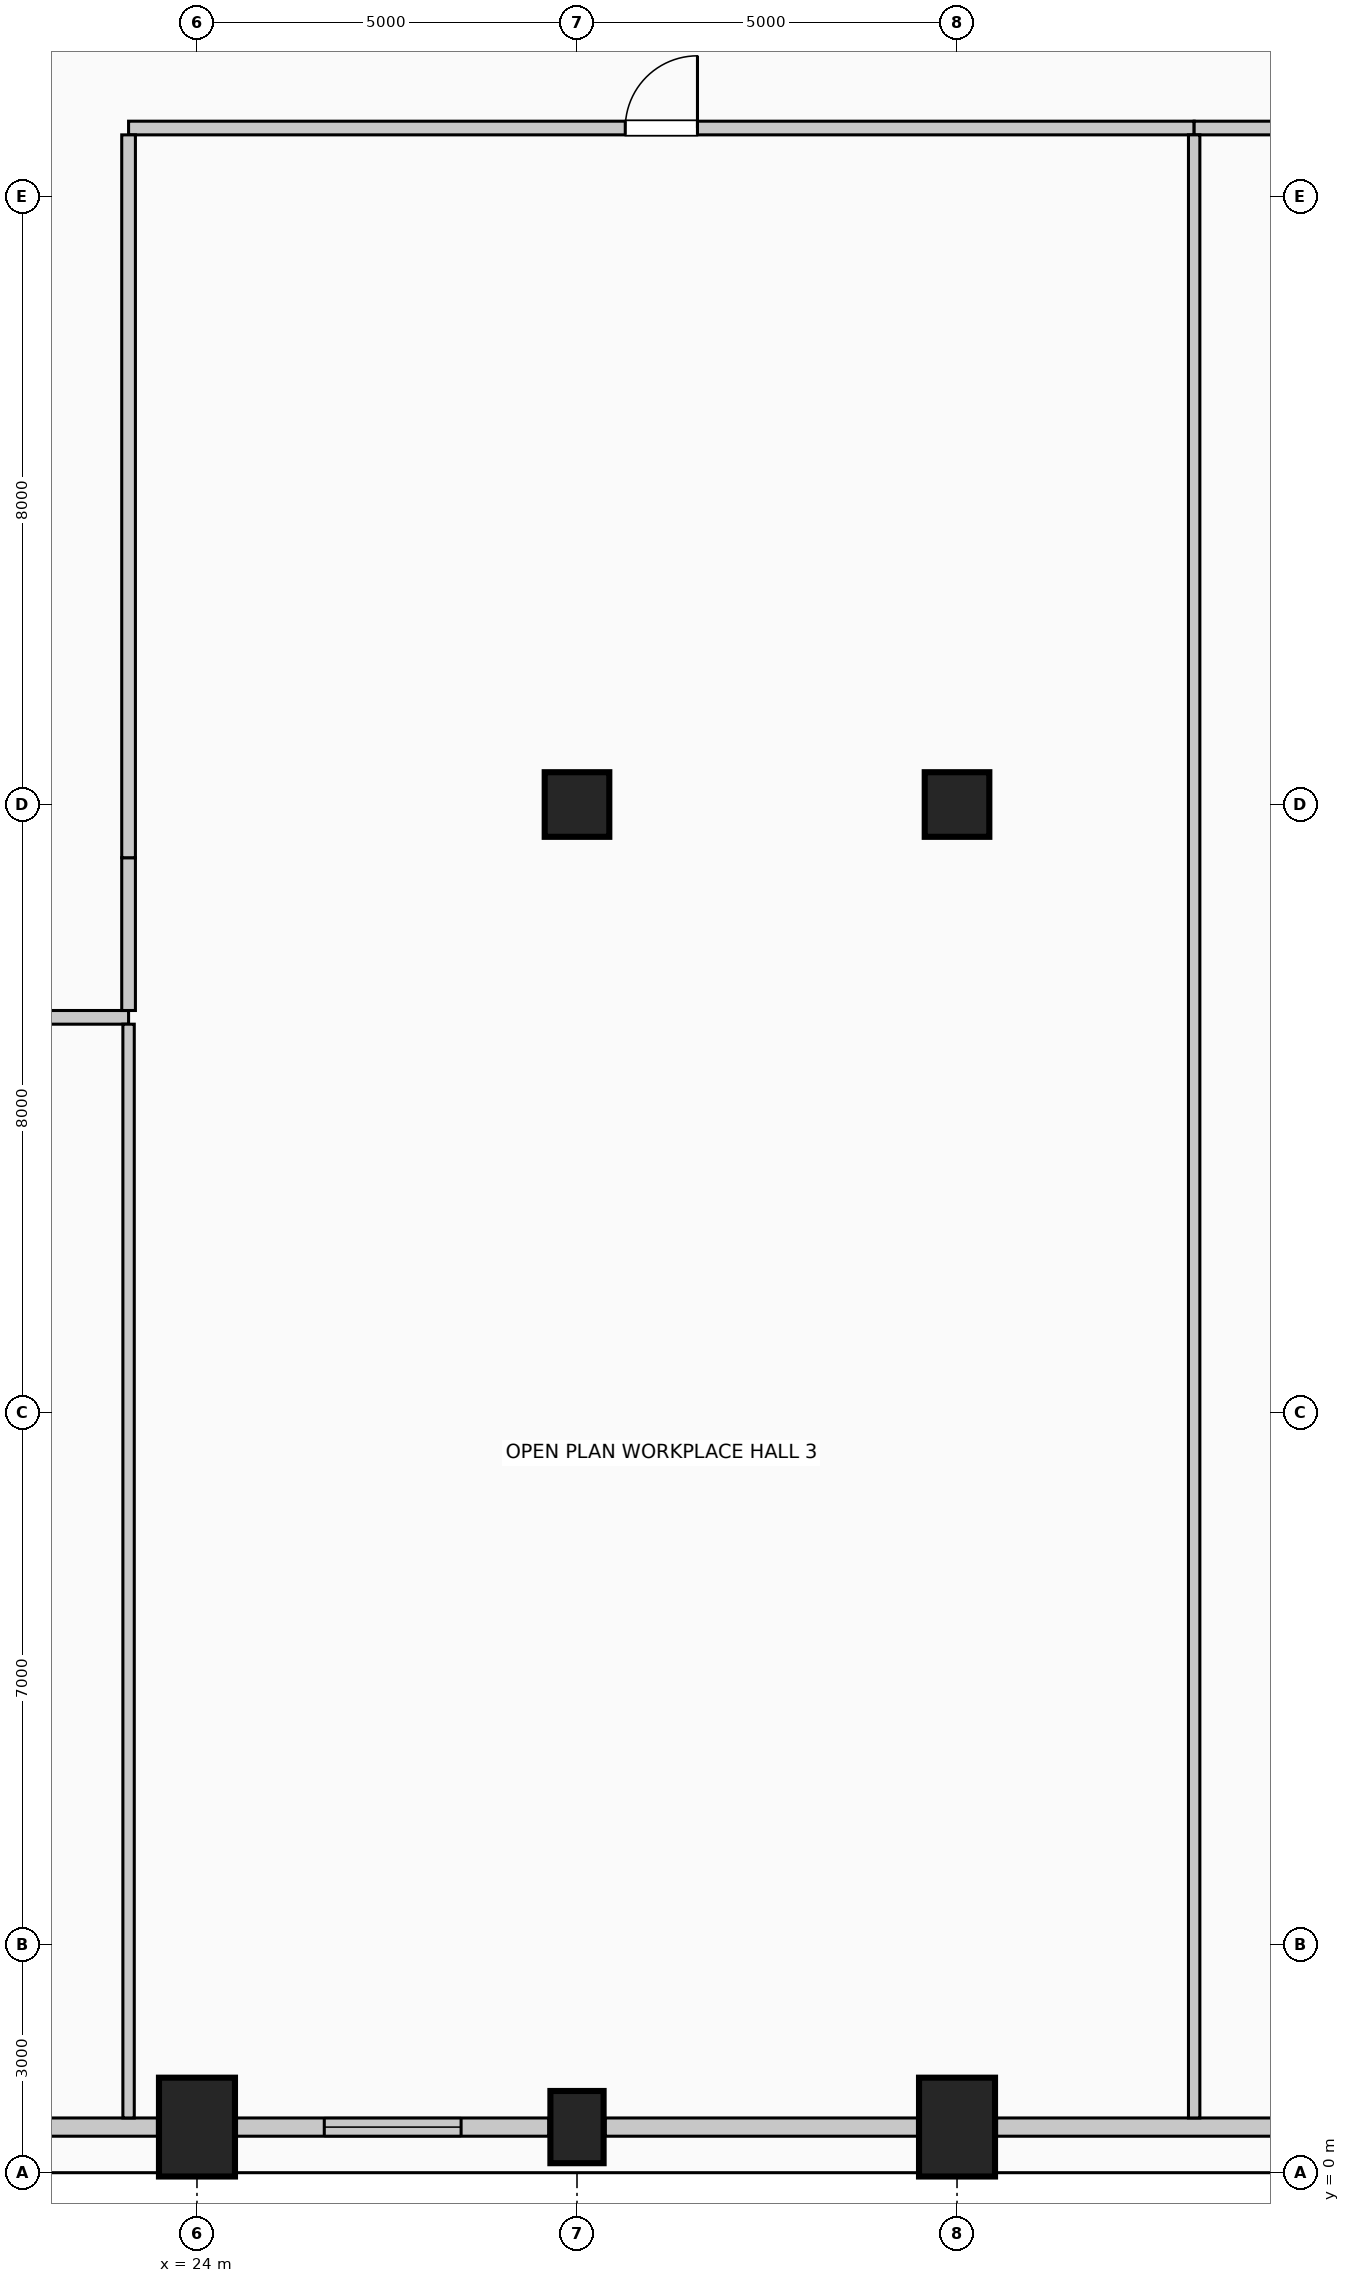
"""IFC4 building model, lengths in metres.
Left out: names, types, materials, properties, quantities, classifications, styles, units other than length and angle.
Written with IfcOpenShell. Run it as: python <this file> out.ifc"""

import sys

from ifc_helpers import new_model, si_unit, direction, frame, frame_2d, origin, origin_2d, place, context, subcontext, project, spatial, rectangle, circle, extrude, element, fill, save


model = new_model("IFC4")
c1 = context("Model", 3, precision=1e-05, world=origin(), true_north=direction((0.0, 1.0)))
c2 = subcontext(c1, "Body", "Model", "MODEL_VIEW")
j1 = project(units=[si_unit("LENGTHUNIT", "METRE"), si_unit("PLANEANGLEUNIT", "RADIAN")], contexts=[c1])
p1 = place(None, origin())
s1 = spatial("IfcSite", under=j1, at=p1, CompositionType="ELEMENT")
p2 = place(p1, origin())
s2 = spatial("IfcBuilding", under=s1, at=p2, CompositionType="ELEMENT")
p3 = place(p2, frame((0.0, 0.0, 272.6)))
s3 = spatial("IfcBuildingStorey", under=s2, at=p3, CompositionType="ELEMENT", Elevation=272.6)
p4 = place(p3, frame((24.0, 0.6, 0.0), z_axis=(0.0, 0.0, 1.0), x_axis=(1.0, 0.0, 0.0)))
e1 = element("IfcColumn", 1, at=p4, inside=s3, PredefinedType="COLUMN", context=c2, shape_type="SweptSolid", body=[
    extrude(rectangle(XDim=1.0, YDim=1.3, at=origin_2d()), origin(), (0.0, 0.0, 1.0), 4.0),
])
p5 = place(p3, frame((29.0, 0.6, 0.0), z_axis=(0.0, 0.0, 1.0), x_axis=(1.0, 0.0, 0.0)))
e2 = element("IfcColumn", 2, at=p5, inside=s3, PredefinedType="COLUMN", context=c2, shape_type="SweptSolid", body=[
    extrude(rectangle(XDim=0.7, YDim=0.95, at=origin_2d()), origin(), (0.0, 0.0, 1.0), 4.0),
])
p6 = place(p3, frame((34.0, 0.6, 0.0), z_axis=(0.0, 0.0, 1.0), x_axis=(1.0, 0.0, 0.0)))
e3 = element("IfcColumn", 3, at=p6, inside=s3, PredefinedType="COLUMN", context=c2, shape_type="SweptSolid", body=[
    extrude(rectangle(XDim=1.0, YDim=1.3, at=origin_2d()), origin(), (0.0, 0.0, 1.0), 4.0),
])
for number, where, z_axis, x_axis in (
    (4, (29.0, 18.0, 0.0), (0.0, 0.0, 1.0), (1.0, 0.0, 0.0)),
    (5, (34.0, 18.0, 0.0), (0.0, 0.0, 1.0), (1.0, 0.0, 0.0)),
):
    element("IfcColumn", number, at=place(p3, frame(where, z_axis=z_axis, x_axis=x_axis)), inside=s3, PredefinedType="COLUMN", context=c2, shape_type="SweptSolid", body=[
        extrude(circle(Radius=0.425, at=origin_2d()), origin(), (0.0, 0.0, 1.0), 4.0),
    ])
p7 = place(p3, frame((23.48, 0.6, 0.0), z_axis=(0.0, 0.0, 1.0), x_axis=(-1.0, 0.0, 0.0)))
e6 = element("IfcWall", 6, at=p7, inside=s3, PredefinedType="SOLIDWALL", context=c2, shape_type="SweptSolid", body=[
    extrude(rectangle(XDim=6.56, YDim=0.24, at=frame_2d((3.28, 0.0))), origin(), (0.0, 0.0, 1.0), 3.0),
])
p8 = place(p7, frame((3.773, 0.0, 0.42)))
e7 = element("IfcOpeningElement", 7, at=p8, cuts=e6, PredefinedType="OPENING", context=c2, shape_type="SweptSolid", body=[
    extrude(rectangle(XDim=1.8, YDim=2.2, at=frame_2d((0.9, 1.1))), frame((0.0, 0.13, 0.0), z_axis=(0.0, -1.0, 0.0), x_axis=(1.0, 0.0, 0.0)), (0.0, 0.0, 1.0), 0.26),
])
p9 = place(p3, frame((28.63, 0.6, 0.0), z_axis=(0.0, 0.0, 1.0), x_axis=(-1.0, 0.0, 0.0)))
e8 = element("IfcWall", 8, at=p9, inside=s3, PredefinedType="SOLIDWALL", context=c2, shape_type="SweptSolid", body=[
    extrude(rectangle(XDim=4.11, YDim=0.24, at=frame_2d((2.055, 0.0))), origin(), (0.0, 0.0, 1.0), 3.0),
])
p10 = place(p9, frame((1.155, 0.0, 0.42)))
e9 = element("IfcOpeningElement", 9, at=p10, cuts=e8, PredefinedType="OPENING", context=c2, shape_type="SweptSolid", body=[
    extrude(rectangle(XDim=1.8, YDim=2.2, at=frame_2d((0.9, 1.1))), frame((0.0, 0.13, 0.0), z_axis=(0.0, -1.0, 0.0), x_axis=(1.0, 0.0, 0.0)), (0.0, 0.0, 1.0), 0.26),
])
p11 = place(p3, frame((33.48, 0.6, 0.0), z_axis=(0.0, 0.0, 1.0), x_axis=(-1.0, 0.0, 0.0)))
e10 = element("IfcWall", 10, at=p11, inside=s3, PredefinedType="SOLIDWALL", context=c2, shape_type="SweptSolid", body=[
    extrude(rectangle(XDim=4.11, YDim=0.24, at=frame_2d((2.055, 0.0))), origin(), (0.0, 0.0, 1.0), 3.0),
])
p12 = place(p3, frame((41.08, 0.6, 0.0), z_axis=(0.0, 0.0, 1.0), x_axis=(-1.0, 0.0, 0.0)))
e11 = element("IfcWall", 11, at=p12, inside=s3, PredefinedType="SOLIDWALL", context=c2, shape_type="SweptSolid", body=[
    extrude(rectangle(XDim=6.56, YDim=0.24, at=frame_2d((3.28, 0.0))), origin(), (0.0, 0.0, 1.0), 3.0),
])
p13 = place(p12, frame((0.987, 0.0, 0.42)))
e12 = element("IfcOpeningElement", 12, at=p13, cuts=e11, PredefinedType="OPENING", context=c2, shape_type="SweptSolid", body=[
    extrude(rectangle(XDim=1.8, YDim=2.2, at=frame_2d((0.9, 1.1))), frame((0.0, 0.13, 0.0), z_axis=(0.0, -1.0, 0.0), x_axis=(1.0, 0.0, 0.0)), (0.0, 0.0, 1.0), 0.26),
])
p14 = place(p3, frame((10.52, 15.2, 0.0), z_axis=(0.0, 0.0, 1.0), x_axis=(1.0, 0.0, 0.0)))
e13 = element("IfcWall", 13, at=p14, inside=s3, PredefinedType="PARTITIONING", context=c2, shape_type="SweptSolid", body=[
    extrude(rectangle(XDim=12.58, YDim=0.18, at=frame_2d((6.29, 0.0))), origin(), (0.0, 0.0, 1.0), 3.75),
])
p15 = place(p14, frame((5.765, 0.0, 0.0)))
e14 = element("IfcOpeningElement", 14, at=p15, cuts=e13, PredefinedType="OPENING", context=c2, shape_type="SweptSolid", body=[
    extrude(rectangle(XDim=1.05, YDim=2.15, at=frame_2d((0.525, 1.075))), frame((0.0, 0.1, 0.0), z_axis=(0.0, -1.0, 0.0), x_axis=(1.0, 0.0, 0.0)), (0.0, 0.0, 1.0), 0.2),
])
p16 = place(p3, frame((23.1, 26.9, 0.0), z_axis=(0.0, 0.0, 1.0), x_axis=(1.0, 0.0, 0.0)))
e15 = element("IfcWall", 15, at=p16, inside=s3, PredefinedType="PARTITIONING", context=c2, shape_type="SweptSolid", body=[
    extrude(rectangle(XDim=14.02, YDim=0.18, at=frame_2d((7.01, 0.0))), origin(), (0.0, 0.0, 1.0), 3.75),
])
p17 = place(p16, frame((6.535, 0.0, 0.0)))
e16 = element("IfcOpeningElement", 16, at=p17, cuts=e15, PredefinedType="OPENING", context=c2, shape_type="SweptSolid", body=[
    extrude(rectangle(XDim=0.95, YDim=2.15, at=frame_2d((0.475, 1.075))), frame((0.0, 0.1, 0.0), z_axis=(0.0, -1.0, 0.0), x_axis=(1.0, 0.0, 0.0)), (0.0, 0.0, 1.0), 0.2),
])
p18 = place(p3, frame((37.12, 26.9, 0.0), z_axis=(0.0, 0.0, 1.0), x_axis=(1.0, 0.0, 0.0)))
e17 = element("IfcWall", 17, at=p18, inside=s3, PredefinedType="PARTITIONING", context=c2, shape_type="SweptSolid", body=[
    extrude(rectangle(XDim=6.84, YDim=0.18, at=frame_2d((3.42, 0.0))), origin(), (0.0, 0.0, 1.0), 3.75),
])
p19 = place(p18, frame((2.895, 0.0, 0.0)))
e18 = element("IfcOpeningElement", 18, at=p19, cuts=e17, PredefinedType="OPENING", context=c2, shape_type="SweptSolid", body=[
    extrude(rectangle(XDim=1.05, YDim=2.15, at=frame_2d((0.525, 1.075))), frame((0.0, 0.1, 0.0), z_axis=(0.0, -1.0, 0.0), x_axis=(1.0, 0.0, 0.0)), (0.0, 0.0, 1.0), 0.2),
])
p20 = place(p3, frame((23.1, 0.72, 0.0), z_axis=(0.0, 0.0, 1.0), x_axis=(0.0, 1.0, 0.0)))
e19 = element("IfcWall", 19, at=p20, inside=s3, PredefinedType="PARTITIONING", context=c2, shape_type="SweptSolid", body=[
    extrude(rectangle(XDim=14.39, YDim=0.15, at=frame_2d((7.195, 0.0))), origin(), (0.0, 0.0, 1.0), 3.75),
])
p21 = place(p3, frame((23.1, 15.29, 0.0), z_axis=(0.0, 0.0, 1.0), x_axis=(0.0, 1.0, 0.0)))
e20 = element("IfcWall", 20, at=p21, inside=s3, PredefinedType="PARTITIONING", context=c2, shape_type="SweptSolid", body=[
    extrude(rectangle(XDim=2.01, YDim=0.18, at=frame_2d((1.005, 0.0))), origin(), (0.0, 0.0, 1.0), 3.75),
])
p22 = place(p3, frame((23.1, 17.3, 0.0), z_axis=(0.0, 0.0, 1.0), x_axis=(0.0, 1.0, 0.0)))
e21 = element("IfcWall", 21, at=p22, inside=s3, PredefinedType="PARTITIONING", context=c2, shape_type="SweptSolid", body=[
    extrude(rectangle(XDim=9.51, YDim=0.18, at=frame_2d((4.755, 0.0))), origin(), (0.0, 0.0, 1.0), 3.75),
])
p23 = place(p3, frame((37.12, 0.72, 0.0), z_axis=(0.0, 0.0, 1.0), x_axis=(0.0, 1.0, 0.0)))
e22 = element("IfcWall", 22, at=p23, inside=s3, PredefinedType="PARTITIONING", context=c2, shape_type="SweptSolid", body=[
    extrude(rectangle(XDim=26.09, YDim=0.15, at=frame_2d((13.045, 0.0))), origin(), (0.0, 0.0, 1.0), 3.75),
])
p24 = place(p10, origin())
e23 = element("IfcWindow", 23, at=p24, inside=s3, PartitioningType="SINGLE_PANEL", PredefinedType="WINDOW", context=c2, shape_type="SweptSolid", body=[
    extrude(rectangle(XDim=1.8, YDim=2.2, at=frame_2d((0.9, 1.1))), frame((0.0, 0.03, 0.0), z_axis=(0.0, -1.0, 0.0), x_axis=(1.0, 0.0, 0.0)), (0.0, 0.0, 1.0), 0.06),
])
fill(e9, e23)
p25 = place(p17, origin())
e24 = element("IfcDoor", 24, at=p25, inside=s3, OperationType="SINGLE_SWING_RIGHT", PredefinedType="DOOR", context=c2, shape_type="SweptSolid", body=[
    extrude(rectangle(XDim=0.95, YDim=2.15, at=frame_2d((0.475, 1.075))), frame((0.0, 0.025, 0.0), z_axis=(0.0, -1.0, 0.0), x_axis=(1.0, 0.0, 0.0)), (0.0, 0.0, 1.0), 0.05),
])
fill(e16, e24)
save(model, sys.argv[1])
